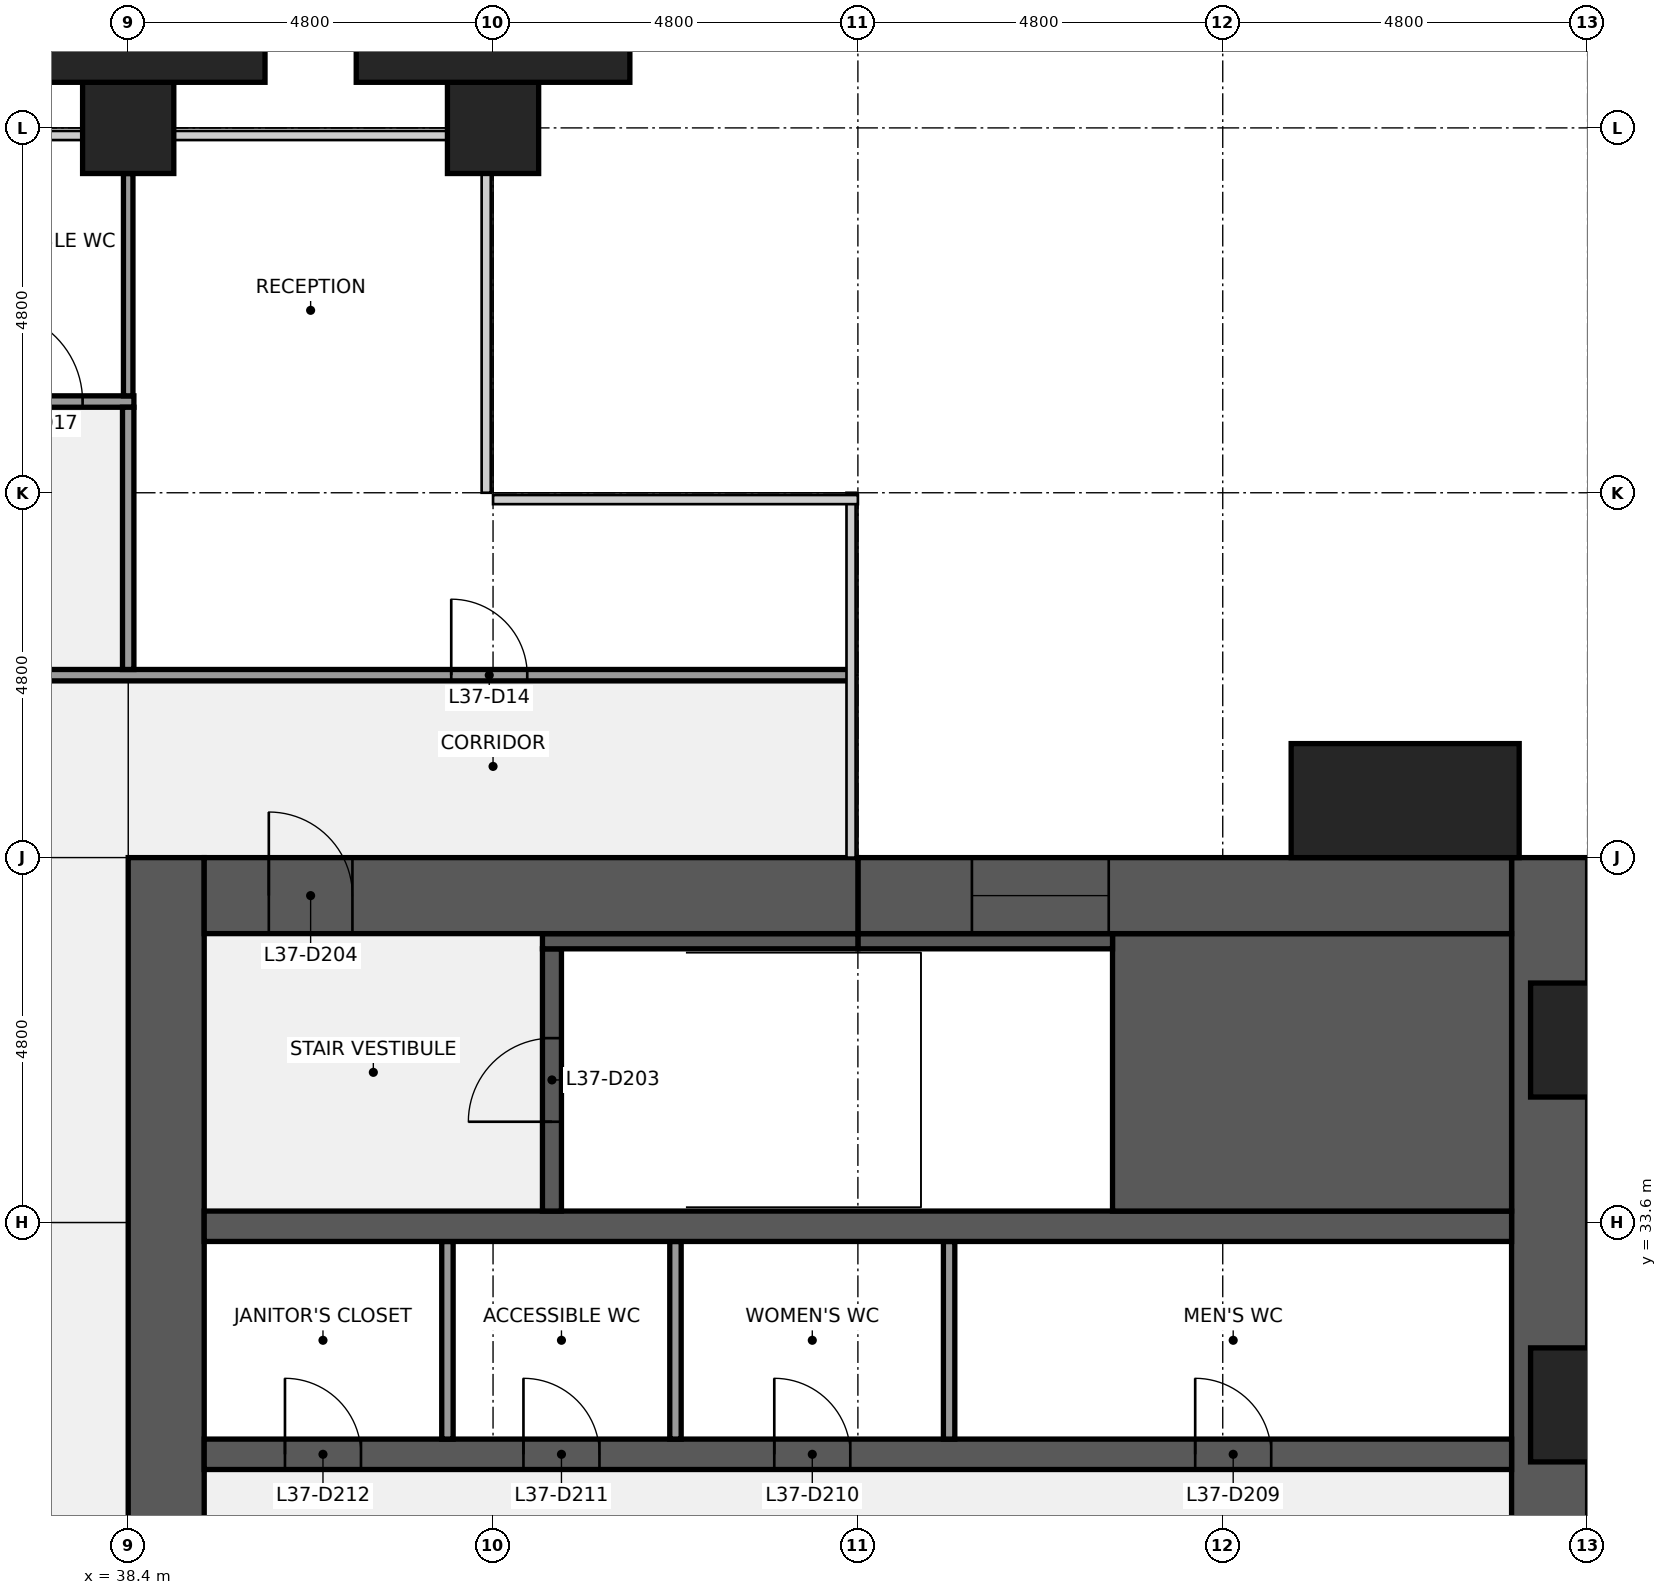
"""IFC4 building model, lengths in metres.
Left out: names, types, materials, properties, quantities, classifications, styles, units other than length and angle.
Written with IfcOpenShell. Run it as: python <this file> out.ifc"""

import sys

from ifc_helpers import new_model, si_unit, direction, frame, frame_2d, origin, origin_2d, place, context, subcontext, project, spatial, rectangle, extrude, element, fill, save


model = new_model("IFC4")
c1 = context("Model", 3, precision=1e-05, world=origin(), true_north=direction((0.0, 1.0)))
c2 = subcontext(c1, "Body", "Model", "MODEL_VIEW")
j1 = project(units=[si_unit("LENGTHUNIT", "METRE"), si_unit("PLANEANGLEUNIT", "RADIAN")], contexts=[c1])
p1 = place(None, origin())
s1 = spatial("IfcSite", under=j1, at=p1, CompositionType="ELEMENT")
p2 = place(p1, origin())
s2 = spatial("IfcBuilding", under=s1, at=p2, CompositionType="ELEMENT")
p3 = place(p2, frame((0.0, 0.0, 168.1)))
s3 = spatial("IfcBuildingStorey", under=s2, at=p3, CompositionType="ELEMENT", Elevation=168.1)
for number, where, z_axis, x_axis in (
    (1, (38.4, 48.0, 0.0), (0.0, 0.0, 1.0), (1.0, 0.0, 0.0)),
    (2, (43.2, 48.0, 0.0), (0.0, 0.0, 1.0), (1.0, 0.0, 0.0)),
):
    element("IfcColumn", number, at=place(p3, frame(where, z_axis=z_axis, x_axis=x_axis)), inside=s3, PredefinedType="COLUMN", context=c2, shape_type="SweptSolid", body=[
        extrude(rectangle(XDim=1.2, YDim=1.2, at=origin_2d()), origin(), (0.0, 0.0, 1.0), 4.0),
    ])
p4 = place(p3, frame((57.1, 38.4, 0.0), z_axis=(0.0, 0.0, 1.0), x_axis=(0.0, -1.0, 0.0)))
e3 = element("IfcWall", 3, at=p4, inside=s3, PredefinedType="SHEAR", context=c2, shape_type="SweptSolid", body=[
    extrude(rectangle(XDim=28.8, YDim=1.0, at=frame_2d((14.4, 0.0))), origin(), (0.0, 0.0, 1.0), 3.84),
])
p5 = place(p4, frame((18.45, 0.0, 0.9)))
e4 = element("IfcOpeningElement", 4, at=p5, cuts=e3, PredefinedType="OPENING", context=c2, shape_type="SweptSolid", body=[
    extrude(rectangle(XDim=1.5, YDim=1.5, at=frame_2d((0.75, 0.75))), frame((0.0, 0.51, 0.0), z_axis=(0.0, -1.0, 0.0), x_axis=(1.0, 0.0, 0.0)), (0.0, 0.0, 1.0), 1.02),
])
p6 = place(p4, frame((8.85, 0.0, 0.9)))
e5 = element("IfcOpeningElement", 5, at=p6, cuts=e3, PredefinedType="OPENING", context=c2, shape_type="SweptSolid", body=[
    extrude(rectangle(XDim=1.5, YDim=1.5, at=frame_2d((0.75, 0.75))), frame((0.0, 0.51, 0.0), z_axis=(0.0, -1.0, 0.0), x_axis=(1.0, 0.0, 0.0)), (0.0, 0.0, 1.0), 1.02),
])
p7 = place(p3, frame((38.9, 9.6, 0.0), z_axis=(0.0, 0.0, 1.0), x_axis=(0.0, 1.0, 0.0)))
e6 = element("IfcWall", 6, at=p7, inside=s3, PredefinedType="SHEAR", context=c2, shape_type="SweptSolid", body=[
    extrude(rectangle(XDim=28.8, YDim=1.0, at=frame_2d((14.4, 0.0))), origin(), (0.0, 0.0, 1.0), 3.84),
])
p8 = place(p7, frame((8.7, 0.0, 0.0)))
e7 = element("IfcOpeningElement", 7, at=p8, cuts=e6, PredefinedType="OPENING", context=c2, shape_type="SweptSolid", body=[
    extrude(rectangle(XDim=1.8, YDim=2.1, at=frame_2d((0.9, 1.05))), frame((0.0, 0.51, 0.0), z_axis=(0.0, -1.0, 0.0), x_axis=(1.0, 0.0, 0.0)), (0.0, 0.0, 1.0), 1.02),
])
p9 = place(p7, frame((18.3, 0.0, 0.0)))
e8 = element("IfcOpeningElement", 8, at=p9, cuts=e6, PredefinedType="OPENING", context=c2, shape_type="SweptSolid", body=[
    extrude(rectangle(XDim=1.8, YDim=2.1, at=frame_2d((0.9, 1.05))), frame((0.0, 0.51, 0.0), z_axis=(0.0, -1.0, 0.0), x_axis=(1.0, 0.0, 0.0)), (0.0, 0.0, 1.0), 1.02),
])
p10 = place(p3, frame((39.4, 30.55, 0.0), z_axis=(0.0, 0.0, 1.0), x_axis=(1.0, 0.0, 0.0)))
e9 = element("IfcWall", 9, at=p10, inside=s3, PredefinedType="SHEAR", context=c2, shape_type="SweptSolid", body=[
    extrude(rectangle(XDim=17.2, YDim=0.4, at=frame_2d((8.6, 0.0))), origin(), (0.0, 0.0, 1.0), 3.84),
])
p11 = place(p10, frame((13.038, 0.0, 0.0)))
e10 = element("IfcOpeningElement", 10, at=p11, cuts=e9, PredefinedType="OPENING", context=c2, shape_type="SweptSolid", body=[
    extrude(rectangle(XDim=1.0, YDim=2.1, at=frame_2d((0.5, 1.05))), frame((0.0, 0.21, 0.0), z_axis=(0.0, -1.0, 0.0), x_axis=(1.0, 0.0, 0.0)), (0.0, 0.0, 1.0), 0.42),
])
p12 = place(p10, frame((7.5, 0.0, 0.0)))
e11 = element("IfcOpeningElement", 11, at=p12, cuts=e9, PredefinedType="OPENING", context=c2, shape_type="SweptSolid", body=[
    extrude(rectangle(XDim=1.0, YDim=2.1, at=frame_2d((0.5, 1.05))), frame((0.0, 0.21, 0.0), z_axis=(0.0, -1.0, 0.0), x_axis=(1.0, 0.0, 0.0)), (0.0, 0.0, 1.0), 0.42),
])
p13 = place(p10, frame((4.2, 0.0, 0.0)))
e12 = element("IfcOpeningElement", 12, at=p13, cuts=e9, PredefinedType="OPENING", context=c2, shape_type="SweptSolid", body=[
    extrude(rectangle(XDim=1.0, YDim=2.1, at=frame_2d((0.5, 1.05))), frame((0.0, 0.21, 0.0), z_axis=(0.0, -1.0, 0.0), x_axis=(1.0, 0.0, 0.0)), (0.0, 0.0, 1.0), 0.42),
])
p14 = place(p10, frame((1.062, 0.0, 0.0)))
e13 = element("IfcOpeningElement", 13, at=p14, cuts=e9, PredefinedType="OPENING", context=c2, shape_type="SweptSolid", body=[
    extrude(rectangle(XDim=1.0, YDim=2.1, at=frame_2d((0.5, 1.05))), frame((0.0, 0.21, 0.0), z_axis=(0.0, -1.0, 0.0), x_axis=(1.0, 0.0, 0.0)), (0.0, 0.0, 1.0), 0.42),
])
for number, where, z_axis, x_axis in (
    (14, (49.2, 30.75, 0.0), (0.0, 0.0, 1.0), (0.0, 1.0, 0.0)),
    (15, (45.6, 30.75, 0.0), (0.0, 0.0, 1.0), (0.0, 1.0, 0.0)),
    (16, (42.6, 30.75, 0.0), (0.0, 0.0, 1.0), (0.0, 1.0, 0.0)),
):
    element("IfcWall", number, at=place(p3, frame(where, z_axis=z_axis, x_axis=x_axis)), inside=s3, PredefinedType="PARTITIONING", context=c2, shape_type="SweptSolid", body=[
        extrude(rectangle(XDim=2.6, YDim=0.15, at=frame_2d((1.3, 0.0))), origin(), (0.0, 0.0, 1.0), 3.84),
    ])
p15 = place(p3, frame((39.4, 33.55, 0.0), z_axis=(0.0, 0.0, 1.0), x_axis=(1.0, 0.0, 0.0)))
e17 = element("IfcWall", 17, at=p15, inside=s3, PredefinedType="SHEAR", context=c2, shape_type="SweptSolid", body=[
    extrude(rectangle(XDim=17.2, YDim=0.4, at=frame_2d((8.6, 0.0))), origin(), (0.0, 0.0, 1.0), 3.84),
])
p16 = place(p3, frame((51.35, 35.575, 0.0), z_axis=(0.0, 0.0, 1.0), x_axis=(1.0, 0.0, 0.0)))
e18 = element("IfcWall", 18, at=p16, inside=s3, PredefinedType="SHEAR", context=c2, shape_type="SweptSolid", body=[
    extrude(rectangle(XDim=5.25, YDim=3.65, at=frame_2d((2.625, 0.0))), origin(), (0.0, 0.0, 1.0), 3.84),
])
p17 = place(p3, frame((43.975, 33.75, 0.0), z_axis=(0.0, 0.0, 1.0), x_axis=(0.0, 1.0, 0.0)))
e19 = element("IfcWall", 19, at=p17, inside=s3, PredefinedType="SHEAR", context=c2, shape_type="SweptSolid", body=[
    extrude(rectangle(XDim=3.45, YDim=0.25, at=frame_2d((1.725, 0.0))), origin(), (0.0, 0.0, 1.0), 3.84),
])
p18 = place(p17, frame((1.175, 0.0, 0.0)))
e20 = element("IfcOpeningElement", 20, at=p18, cuts=e19, PredefinedType="OPENING", context=c2, shape_type="SweptSolid", body=[
    extrude(rectangle(XDim=1.1, YDim=2.1, at=frame_2d((0.55, 1.05))), frame((0.0, 0.135, 0.0), z_axis=(0.0, -1.0, 0.0), x_axis=(1.0, 0.0, 0.0)), (0.0, 0.0, 1.0), 0.27),
])
p19 = place(p3, frame((48.0, 37.3, 0.0), z_axis=(0.0, 0.0, 1.0), x_axis=(1.0, 0.0, 0.0)))
e21 = element("IfcWall", 21, at=p19, inside=s3, PredefinedType="SHEAR", context=c2, shape_type="SweptSolid", body=[
    extrude(rectangle(XDim=3.35, YDim=0.2, at=frame_2d((1.675, 0.0))), origin(), (0.0, 0.0, 1.0), 3.84),
])
p20 = place(p3, frame((43.85, 37.3, 0.0), z_axis=(0.0, 0.0, 1.0), x_axis=(1.0, 0.0, 0.0)))
e22 = element("IfcWall", 22, at=p20, inside=s3, PredefinedType="SHEAR", context=c2, shape_type="SweptSolid", body=[
    extrude(rectangle(XDim=4.15, YDim=0.2, at=frame_2d((2.075, 0.0))), origin(), (0.0, 0.0, 1.0), 3.84),
])
p21 = place(p3, frame((48.0, 37.9, 0.0), z_axis=(0.0, 0.0, 1.0), x_axis=(1.0, 0.0, 0.0)))
e23 = element("IfcWall", 23, at=p21, inside=s3, PredefinedType="SHEAR", context=c2, shape_type="SweptSolid", body=[
    extrude(rectangle(XDim=8.6, YDim=1.0, at=frame_2d((4.3, 0.0))), origin(), (0.0, 0.0, 1.0), 3.84),
])
p22 = place(p21, frame((1.5, 0.0, 0.9)))
e24 = element("IfcOpeningElement", 24, at=p22, cuts=e23, PredefinedType="OPENING", context=c2, shape_type="SweptSolid", body=[
    extrude(rectangle(XDim=1.8, YDim=1.5, at=frame_2d((0.9, 0.75))), frame((0.0, 0.51, 0.0), z_axis=(0.0, -1.0, 0.0), x_axis=(1.0, 0.0, 0.0)), (0.0, 0.0, 1.0), 1.02),
])
p23 = place(p3, frame((39.4, 37.9, 0.0), z_axis=(0.0, 0.0, 1.0), x_axis=(1.0, 0.0, 0.0)))
e25 = element("IfcWall", 25, at=p23, inside=s3, PredefinedType="SHEAR", context=c2, shape_type="SweptSolid", body=[
    extrude(rectangle(XDim=8.6, YDim=1.0, at=frame_2d((4.3, 0.0))), origin(), (0.0, 0.0, 1.0), 3.84),
])
p24 = place(p23, frame((0.85, 0.0, 0.0)))
e26 = element("IfcOpeningElement", 26, at=p24, cuts=e25, PredefinedType="OPENING", context=c2, shape_type="SweptSolid", body=[
    extrude(rectangle(XDim=1.1, YDim=2.1, at=frame_2d((0.55, 1.05))), frame((0.0, 0.51, 0.0), z_axis=(0.0, -1.0, 0.0), x_axis=(1.0, 0.0, 0.0)), (0.0, 0.0, 1.0), 1.02),
])
p25 = place(p3, frame((9.7, 40.8, 0.0), z_axis=(0.0, 0.0, 1.0), x_axis=(1.0, 0.0, 0.0)))
e27 = element("IfcWall", 27, at=p25, inside=s3, PredefinedType="PARTITIONING", context=c2, shape_type="SweptSolid", body=[
    extrude(rectangle(XDim=38.2, YDim=0.15, at=frame_2d((19.1, 0.0))), origin(), (0.0, 0.0, 1.0), 2.936),
])
p26 = place(p25, frame((3.05, 0.0, 0.0)))
e28 = element("IfcOpeningElement", 28, at=p26, cuts=e27, PredefinedType="OPENING", context=c2, shape_type="SweptSolid", body=[
    extrude(rectangle(XDim=1.0, YDim=2.1, at=frame_2d((0.5, 1.05))), frame((0.0, 0.085, 0.0), z_axis=(0.0, -1.0, 0.0), x_axis=(1.0, 0.0, 0.0)), (0.0, 0.0, 1.0), 0.17),
])
p27 = place(p25, frame((7.8, 0.0, 0.0)))
e29 = element("IfcOpeningElement", 29, at=p27, cuts=e27, PredefinedType="OPENING", context=c2, shape_type="SweptSolid", body=[
    extrude(rectangle(XDim=1.0, YDim=2.1, at=frame_2d((0.5, 1.05))), frame((0.0, 0.085, 0.0), z_axis=(0.0, -1.0, 0.0), x_axis=(1.0, 0.0, 0.0)), (0.0, 0.0, 1.0), 0.17),
])
p28 = place(p25, frame((15.0, 0.0, 0.0)))
e30 = element("IfcOpeningElement", 30, at=p28, cuts=e27, PredefinedType="OPENING", context=c2, shape_type="SweptSolid", body=[
    extrude(rectangle(XDim=1.0, YDim=2.1, at=frame_2d((0.5, 1.05))), frame((0.0, 0.085, 0.0), z_axis=(0.0, -1.0, 0.0), x_axis=(1.0, 0.0, 0.0)), (0.0, 0.0, 1.0), 0.17),
])
p29 = place(p25, frame((24.6, 0.0, 0.0)))
e31 = element("IfcOpeningElement", 31, at=p29, cuts=e27, PredefinedType="OPENING", context=c2, shape_type="SweptSolid", body=[
    extrude(rectangle(XDim=1.0, YDim=2.1, at=frame_2d((0.5, 1.05))), frame((0.0, 0.085, 0.0), z_axis=(0.0, -1.0, 0.0), x_axis=(1.0, 0.0, 0.0)), (0.0, 0.0, 1.0), 0.17),
])
p30 = place(p25, frame((32.95, 0.0, 0.0)))
e32 = element("IfcOpeningElement", 32, at=p30, cuts=e27, PredefinedType="OPENING", context=c2, shape_type="SweptSolid", body=[
    extrude(rectangle(XDim=1.0, YDim=2.1, at=frame_2d((0.5, 1.05))), frame((0.0, 0.085, 0.0), z_axis=(0.0, -1.0, 0.0), x_axis=(1.0, 0.0, 0.0)), (0.0, 0.0, 1.0), 0.17),
])
p31 = place(p3, frame((31.125, 44.4, 0.0), z_axis=(0.0, 0.0, 1.0), x_axis=(1.0, 0.0, 0.0)))
e33 = element("IfcWall", 33, at=p31, inside=s3, PredefinedType="PARTITIONING", context=c2, shape_type="SweptSolid", body=[
    extrude(rectangle(XDim=7.35, YDim=0.15, at=frame_2d((3.675, 0.0))), origin(), (0.0, 0.0, 1.0), 2.936),
])
p32 = place(p31, frame((0.825, 0.0, 0.0)))
e34 = element("IfcOpeningElement", 34, at=p32, cuts=e33, PredefinedType="OPENING", context=c2, shape_type="SweptSolid", body=[
    extrude(rectangle(XDim=0.9, YDim=2.1, at=frame_2d((0.45, 1.05))), frame((0.0, 0.085, 0.0), z_axis=(0.0, -1.0, 0.0), x_axis=(1.0, 0.0, 0.0)), (0.0, 0.0, 1.0), 0.17),
])
p33 = place(p31, frame((3.225, 0.0, 0.0)))
e35 = element("IfcOpeningElement", 35, at=p33, cuts=e33, PredefinedType="OPENING", context=c2, shape_type="SweptSolid", body=[
    extrude(rectangle(XDim=0.9, YDim=2.1, at=frame_2d((0.45, 1.05))), frame((0.0, 0.085, 0.0), z_axis=(0.0, -1.0, 0.0), x_axis=(1.0, 0.0, 0.0)), (0.0, 0.0, 1.0), 0.17),
])
p34 = place(p31, frame((5.475, 0.0, 0.0)))
e36 = element("IfcOpeningElement", 36, at=p34, cuts=e33, PredefinedType="OPENING", context=c2, shape_type="SweptSolid", body=[
    extrude(rectangle(XDim=1.2, YDim=2.1, at=frame_2d((0.6, 1.05))), frame((0.0, 0.085, 0.0), z_axis=(0.0, -1.0, 0.0), x_axis=(1.0, 0.0, 0.0)), (0.0, 0.0, 1.0), 0.17),
])
p35 = place(p3, frame((38.4, 44.475, 0.0), z_axis=(0.0, 0.0, 1.0), x_axis=(0.0, 1.0, 0.0)))
e37 = element("IfcWall", 37, at=p35, inside=s3, PredefinedType="PARTITIONING", context=c2, shape_type="SweptSolid", body=[
    extrude(rectangle(XDim=2.925, YDim=0.125, at=frame_2d((1.462, 0.0))), origin(), (0.0, 0.0, 1.0), 2.936),
])
p36 = place(p3, frame((38.4, 40.875, 0.0), z_axis=(0.0, 0.0, 1.0), x_axis=(0.0, 1.0, 0.0)))
e38 = element("IfcWall", 38, at=p36, inside=s3, PredefinedType="PARTITIONING", context=c2, shape_type="SweptSolid", body=[
    extrude(rectangle(XDim=3.45, YDim=0.15, at=frame_2d((1.725, 0.0))), origin(), (0.0, 0.0, 1.0), 2.936),
])
p37 = place(p3, frame((55.2, 39.15, 0.0), z_axis=(0.0, 0.0, 1.0), x_axis=(1.0, 0.0, 0.0)))
e39 = element("IfcColumn", 39, at=p37, inside=s3, PredefinedType="PILASTER", context=c2, shape_type="SweptSolid", body=[
    extrude(rectangle(XDim=3.0, YDim=1.5, at=origin_2d()), origin(), (0.0, 0.0, 1.0), 4.0),
])
for number, where, z_axis, x_axis in (
    (40, (38.4, 49.05, 0.0), (0.0, 0.0, 1.0), (1.0, 0.0, 0.0)),
    (41, (43.2, 49.05, 0.0), (0.0, 0.0, 1.0), (1.0, 0.0, 0.0)),
):
    element("IfcColumn", number, at=place(p3, frame(where, z_axis=z_axis, x_axis=x_axis)), inside=s3, PredefinedType="PILASTER", context=c2, shape_type="SweptSolid", body=[
        extrude(rectangle(XDim=3.6, YDim=0.9, at=origin_2d()), origin(), (0.0, 0.0, 1.0), 4.0),
    ])
p38 = place(p18, origin())
e42 = element("IfcDoor", 42, at=p38, inside=s3, OperationType="SINGLE_SWING_LEFT", PredefinedType="DOOR", context=c2, shape_type="SweptSolid", body=[
    extrude(rectangle(XDim=1.1, YDim=2.1, at=frame_2d((0.55, 1.05))), frame((0.0, 0.025, 0.0), z_axis=(0.0, -1.0, 0.0), x_axis=(1.0, 0.0, 0.0)), (0.0, 0.0, 1.0), 0.05),
])
fill(e20, e42)
p39 = place(p24, origin())
e43 = element("IfcDoor", 43, at=p39, inside=s3, OperationType="SINGLE_SWING_LEFT", PredefinedType="DOOR", context=c2, shape_type="SweptSolid", body=[
    extrude(rectangle(XDim=1.1, YDim=2.1, at=frame_2d((0.55, 1.05))), frame((0.0, 0.025, 0.0), z_axis=(0.0, -1.0, 0.0), x_axis=(1.0, 0.0, 0.0)), (0.0, 0.0, 1.0), 0.05),
])
fill(e26, e43)
p40 = place(p11, origin())
e44 = element("IfcDoor", 44, at=p40, inside=s3, OperationType="SINGLE_SWING_LEFT", PredefinedType="DOOR", context=c2, shape_type="SweptSolid", body=[
    extrude(rectangle(XDim=1.0, YDim=2.1, at=frame_2d((0.5, 1.05))), frame((0.0, 0.025, 0.0), z_axis=(0.0, -1.0, 0.0), x_axis=(1.0, 0.0, 0.0)), (0.0, 0.0, 1.0), 0.05),
])
fill(e10, e44)
p41 = place(p12, origin())
e45 = element("IfcDoor", 45, at=p41, inside=s3, OperationType="SINGLE_SWING_LEFT", PredefinedType="DOOR", context=c2, shape_type="SweptSolid", body=[
    extrude(rectangle(XDim=1.0, YDim=2.1, at=frame_2d((0.5, 1.05))), frame((0.0, 0.025, 0.0), z_axis=(0.0, -1.0, 0.0), x_axis=(1.0, 0.0, 0.0)), (0.0, 0.0, 1.0), 0.05),
])
fill(e11, e45)
p42 = place(p13, origin())
e46 = element("IfcDoor", 46, at=p42, inside=s3, OperationType="SINGLE_SWING_LEFT", PredefinedType="DOOR", context=c2, shape_type="SweptSolid", body=[
    extrude(rectangle(XDim=1.0, YDim=2.1, at=frame_2d((0.5, 1.05))), frame((0.0, 0.025, 0.0), z_axis=(0.0, -1.0, 0.0), x_axis=(1.0, 0.0, 0.0)), (0.0, 0.0, 1.0), 0.05),
])
fill(e12, e46)
p43 = place(p14, origin())
e47 = element("IfcDoor", 47, at=p43, inside=s3, OperationType="SINGLE_SWING_LEFT", PredefinedType="DOOR", context=c2, shape_type="SweptSolid", body=[
    extrude(rectangle(XDim=1.0, YDim=2.1, at=frame_2d((0.5, 1.05))), frame((0.0, 0.025, 0.0), z_axis=(0.0, -1.0, 0.0), x_axis=(1.0, 0.0, 0.0)), (0.0, 0.0, 1.0), 0.05),
])
fill(e13, e47)
p44 = place(p22, origin())
e48 = element("IfcWindow", 48, at=p44, inside=s3, PartitioningType="SINGLE_PANEL", PredefinedType="WINDOW", context=c2, shape_type="SweptSolid", body=[
    extrude(rectangle(XDim=1.8, YDim=1.5, at=frame_2d((0.9, 0.75))), frame((0.0, 0.03, 0.0), z_axis=(0.0, -1.0, 0.0), x_axis=(1.0, 0.0, 0.0)), (0.0, 0.0, 1.0), 0.06),
])
fill(e24, e48)
p45 = place(p30, origin())
e49 = element("IfcDoor", 49, at=p45, inside=s3, OperationType="SINGLE_SWING_LEFT", PredefinedType="DOOR", context=c2, shape_type="SweptSolid", body=[
    extrude(rectangle(XDim=1.0, YDim=2.1, at=frame_2d((0.5, 1.05))), frame((0.0, 0.025, 0.0), z_axis=(0.0, -1.0, 0.0), x_axis=(1.0, 0.0, 0.0)), (0.0, 0.0, 1.0), 0.05),
])
fill(e32, e49)
p46 = place(p34, origin())
e50 = element("IfcDoor", 50, at=p46, inside=s3, OperationType="SINGLE_SWING_LEFT", PredefinedType="DOOR", context=c2, shape_type="SweptSolid", body=[
    extrude(rectangle(XDim=1.2, YDim=2.1, at=frame_2d((0.6, 1.05))), frame((0.0, 0.025, 0.0), z_axis=(0.0, -1.0, 0.0), x_axis=(1.0, 0.0, 0.0)), (0.0, 0.0, 1.0), 0.05),
])
fill(e36, e50)
save(model, sys.argv[1])
